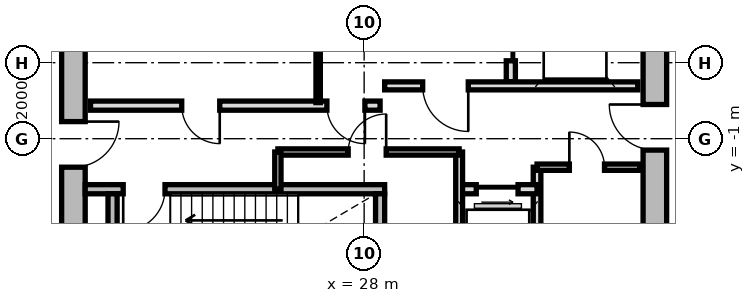
"""IFC4 building model, lengths in metres.
Left out: names, types, materials, properties, quantities, classifications, styles, units other than length and angle.
Written with IfcOpenShell. Run it as: python <this file> out.ifc"""

import sys

from ifc_helpers import new_model, si_unit, direction, frame, frame_2d, origin, place, context, subcontext, project, spatial, rectangle, extrude, source, transform, mapped, element, fill, save


model = new_model("IFC4")
c1 = context("Model", 3, precision=1e-05, world=origin(), true_north=direction((0.0, 1.0)))
c2 = subcontext(c1, "Body", "Model", "MODEL_VIEW")
j1 = project(units=[si_unit("LENGTHUNIT", "METRE"), si_unit("PLANEANGLEUNIT", "RADIAN")], contexts=[c1])
p1 = place(None, origin())
s1 = spatial("IfcSite", under=j1, at=p1, CompositionType="ELEMENT")
p2 = place(p1, origin())
s2 = spatial("IfcBuilding", under=s1, at=p2, CompositionType="ELEMENT")
p3 = place(p2, frame((0.0, 0.0, 186.15)))
s3 = spatial("IfcBuildingStorey", under=s2, at=p3, CompositionType="ELEMENT", Elevation=186.15)
m1 = source(origin(), c2, "Body", "SweptSolid", [
    extrude(rectangle(XDim=11.1, YDim=0.62, at=frame_2d((5.55, 0.0))), origin(), (0.0, 0.0, 1.0), 4.08),
])
p4 = place(p3, frame((20.35, -5.55, 0.0), z_axis=(0.0, 0.0, 1.0), x_axis=(0.0, 1.0, 0.0)))
e1 = element("IfcWall", 1, at=p4, inside=s3, PredefinedType="SHEAR", context=c2, shape_type="MappedRepresentation", body=[
    mapped(m1, transform((0.0, 0.0, 0.0), x_axis=(1.0, 0.0, 0.0), y_axis=(0.0, 1.0, 0.0), z_axis=(0.0, 0.0, 1.0), scale=1.0)),
])
p5 = place(p4, frame((3.8, 0.0, 0.0)))
e2 = element("IfcOpeningElement", 2, at=p5, cuts=e1, PredefinedType="OPENING", context=c2, shape_type="SweptSolid", body=[
    extrude(rectangle(XDim=1.2, YDim=2.15, at=frame_2d((0.6, 1.075))), frame((0.0, 0.32, 0.0), z_axis=(0.0, -1.0, 0.0), x_axis=(1.0, 0.0, 0.0)), (0.0, 0.0, 1.0), 0.64),
])
p6 = place(p3, frame((35.65, 5.55, 0.0), z_axis=(0.0, 0.0, 1.0), x_axis=(0.0, -1.0, 0.0)))
e3 = element("IfcWall", 3, at=p6, inside=s3, PredefinedType="SHEAR", context=c2, shape_type="MappedRepresentation", body=[
    mapped(m1, transform((0.0, 0.0, 0.0), x_axis=(1.0, 0.0, 0.0), y_axis=(0.0, 1.0, 0.0), z_axis=(0.0, 0.0, 1.0), scale=1.0)),
])
p7 = place(p6, frame((5.65, 0.0, 0.0)))
e4 = element("IfcOpeningElement", 4, at=p7, cuts=e3, PredefinedType="OPENING", context=c2, shape_type="SweptSolid", body=[
    extrude(rectangle(XDim=1.2, YDim=2.15, at=frame_2d((0.6, 1.075))), frame((0.0, 0.32, 0.0), z_axis=(0.0, -1.0, 0.0), x_axis=(1.0, 0.0, 0.0)), (0.0, 0.0, 1.0), 0.64),
])
p8 = place(p6, frame((9.3, 0.0, 0.0)))
e5 = element("IfcOpeningElement", 5, at=p8, cuts=e3, PredefinedType="OPENING", context=c2, shape_type="SweptSolid", body=[
    extrude(rectangle(XDim=1.0, YDim=2.1, at=frame_2d((0.5, 1.05))), frame((0.0, 0.32, 0.0), z_axis=(0.0, -1.0, 0.0), x_axis=(1.0, 0.0, 0.0)), (0.0, 0.0, 1.0), 0.64),
])
m2 = source(origin(), c2, "Body", "SweptSolid", [
    extrude(rectangle(XDim=7.88, YDim=0.24, at=frame_2d((3.94, 0.0))), origin(), (0.0, 0.0, 1.0), 4.08),
])
p9 = place(p3, frame((20.66, -2.33, 0.0), z_axis=(0.0, 0.0, 1.0), x_axis=(1.0, 0.0, 0.0)))
e6 = element("IfcWall", 6, at=p9, inside=s3, PredefinedType="PARTITIONING", context=c2, shape_type="MappedRepresentation", body=[
    mapped(m2, transform((0.0, 0.0, 0.0), x_axis=(1.0, 0.0, 0.0), y_axis=(0.0, 1.0, 0.0), z_axis=(0.0, 0.0, 1.0), scale=1.0)),
])
p10 = place(p9, frame((1.0, 0.0, 0.0)))
e7 = element("IfcOpeningElement", 7, at=p10, cuts=e6, PredefinedType="OPENING", context=c2, shape_type="SweptSolid", body=[
    extrude(rectangle(XDim=1.1, YDim=2.15, at=frame_2d((0.55, 1.075))), frame((0.0, 0.13, 0.0), z_axis=(0.0, -1.0, 0.0), x_axis=(1.0, 0.0, 0.0)), (0.0, 0.0, 1.0), 0.26),
])
m3 = source(origin(), c2, "Body", "SweptSolid", [
    extrude(rectangle(XDim=3.19, YDim=0.24, at=frame_2d((1.595, 0.0))), origin(), (0.0, 0.0, 1.0), 4.08),
])
for number, where, z_axis, x_axis in (
    (8, (21.38, -5.64, 0.0), (0.0, 0.0, 1.0), (0.0, 1.0, 0.0)),
    (9, (28.42, -5.64, 0.0), (0.0, 0.0, 1.0), (0.0, 1.0, 0.0)),
):
    element("IfcWall", number, at=place(p3, frame(where, z_axis=z_axis, x_axis=x_axis)), inside=s3, PredefinedType="PARTITIONING", context=c2, shape_type="MappedRepresentation", body=[
        mapped(m3, transform((0.0, 0.0, 0.0), x_axis=(1.0, 0.0, 0.0), y_axis=(0.0, 1.0, 0.0), z_axis=(0.0, 0.0, 1.0), scale=1.0)),
    ])
m4 = source(origin(), c2, "Body", "SweptSolid", [
    extrude(rectangle(XDim=5.0, YDim=0.24, at=frame_2d((2.5, 0.0))), origin(), (0.0, 0.0, 1.0), 4.065),
])
p11 = place(p3, frame((31.86, 0.5, 0.0), z_axis=(0.0, 0.0, 1.0), x_axis=(0.0, 1.0, 0.0)))
e10 = element("IfcWall", 10, at=p11, inside=s3, PredefinedType="PARTITIONING", context=c2, shape_type="MappedRepresentation", body=[
    mapped(m4, transform((0.0, 0.0, 0.0), x_axis=(1.0, 0.0, 0.0), y_axis=(0.0, 1.0, 0.0), z_axis=(0.0, 0.0, 1.0), scale=1.0)),
])
p12 = place(p11, frame((3.05, 0.0, 0.0)))
e11 = element("IfcOpeningElement", 11, at=p12, cuts=e10, PredefinedType="OPENING", context=c2, shape_type="SweptSolid", body=[
    extrude(rectangle(XDim=1.3, YDim=2.2, at=frame_2d((0.65, 1.1))), frame((0.0, 0.13, 0.0), z_axis=(0.0, -1.0, 0.0), x_axis=(1.0, 0.0, 0.0)), (0.0, 0.0, 1.0), 0.26),
])
p13 = place(p11, frame((0.55, 0.0, 0.0)))
e12 = element("IfcOpeningElement", 12, at=p13, cuts=e10, PredefinedType="OPENING", context=c2, shape_type="SweptSolid", body=[
    extrude(rectangle(XDim=1.3, YDim=2.2, at=frame_2d((0.65, 1.1))), frame((0.0, 0.13, 0.0), z_axis=(0.0, -1.0, 0.0), x_axis=(1.0, 0.0, 0.0)), (0.0, 0.0, 1.0), 0.26),
])
m5 = source(origin(), c2, "Body", "SweptSolid", [
    extrude(rectangle(XDim=6.66, YDim=0.21, at=frame_2d((3.33, 0.0))), origin(), (0.0, 0.0, 1.0), 4.065),
])
p14 = place(p3, frame((28.54, 0.39, 0.0), z_axis=(0.0, 0.0, 1.0), x_axis=(1.0, 0.0, 0.0)))
e13 = element("IfcWall", 13, at=p14, inside=s3, PredefinedType="PARTITIONING", context=c2, shape_type="MappedRepresentation", body=[
    mapped(m5, transform((0.0, 0.0, 0.0), x_axis=(1.0, 0.0, 0.0), y_axis=(0.0, 1.0, 0.0), z_axis=(0.0, 0.0, 1.0), scale=1.0)),
])
p15 = place(p14, frame((1.0, 0.0, 0.0)))
e14 = element("IfcOpeningElement", 14, at=p15, cuts=e13, PredefinedType="OPENING", context=c2, shape_type="SweptSolid", body=[
    extrude(rectangle(XDim=1.2, YDim=2.15, at=frame_2d((0.6, 1.075))), frame((0.0, 0.115, 0.0), z_axis=(0.0, -1.0, 0.0), x_axis=(1.0, 0.0, 0.0)), (0.0, 0.0, 1.0), 0.23),
])
m6 = source(origin(), c2, "Body", "SweptSolid", [
    extrude(rectangle(XDim=7.62, YDim=0.24, at=frame_2d((3.81, 0.0))), origin(), (0.0, 0.0, 1.0), 4.065),
])
p16 = place(p3, frame((20.8, -0.13, 0.0), z_axis=(0.0, 0.0, 1.0), x_axis=(1.0, 0.0, 0.0)))
e15 = element("IfcWall", 15, at=p16, inside=s3, PredefinedType="PARTITIONING", context=c2, shape_type="MappedRepresentation", body=[
    mapped(m6, transform((0.0, 0.0, 0.0), x_axis=(1.0, 0.0, 0.0), y_axis=(0.0, 1.0, 0.0), z_axis=(0.0, 0.0, 1.0), scale=1.0)),
])
p17 = place(p16, frame((6.22, 0.0, 0.0)))
e16 = element("IfcOpeningElement", 16, at=p17, cuts=e15, PredefinedType="OPENING", context=c2, shape_type="SweptSolid", body=[
    extrude(rectangle(XDim=1.0, YDim=2.1, at=frame_2d((0.5, 1.05))), frame((0.0, 0.13, 0.0), z_axis=(0.0, -1.0, 0.0), x_axis=(1.0, 0.0, 0.0)), (0.0, 0.0, 1.0), 0.26),
])
p18 = place(p16, frame((2.4, 0.0, 0.0)))
e17 = element("IfcOpeningElement", 17, at=p18, cuts=e15, PredefinedType="OPENING", context=c2, shape_type="SweptSolid", body=[
    extrude(rectangle(XDim=1.0, YDim=2.1, at=frame_2d((0.5, 1.05))), frame((0.0, 0.13, 0.0), z_axis=(0.0, -1.0, 0.0), x_axis=(1.0, 0.0, 0.0)), (0.0, 0.0, 1.0), 0.26),
])
m7 = source(origin(), c2, "Body", "SweptSolid", [
    extrude(rectangle(XDim=2.33, YDim=0.115, at=frame_2d((1.165, 0.0))), origin(), (0.0, 0.0, 1.0), 4.065),
])
p19 = place(p3, frame((26.79, -0.05, 0.0), z_axis=(0.0, 0.0, 1.0), x_axis=(0.0, 1.0, 0.0)))
e18 = element("IfcWall", 18, at=p19, inside=s3, PredefinedType="PARTITIONING", context=c2, shape_type="MappedRepresentation", body=[
    mapped(m7, transform((0.0, 0.0, 0.0), x_axis=(1.0, 0.0, 0.0), y_axis=(0.0, 1.0, 0.0), z_axis=(0.0, 0.0, 1.0), scale=1.0)),
])
m8 = source(origin(), c2, "Body", "SweptSolid", [
    extrude(rectangle(XDim=3.8, YDim=0.2, at=frame_2d((1.9, 0.0))), origin(), (0.0, 0.0, 1.0), 4.065),
])
p20 = place(p3, frame((32.55, -5.55, 0.0), z_axis=(0.0, 0.0, 1.0), x_axis=(0.0, 1.0, 0.0)))
e19 = element("IfcWall", 19, at=p20, inside=s3, PredefinedType="PARTITIONING", context=c2, shape_type="MappedRepresentation", body=[
    mapped(m8, transform((0.0, 0.0, 0.0), x_axis=(1.0, 0.0, 0.0), y_axis=(0.0, 1.0, 0.0), z_axis=(0.0, 0.0, 1.0), scale=1.0)),
])
m9 = source(origin(), c2, "Body", "SweptSolid", [
    extrude(rectangle(XDim=2.05, YDim=0.24, at=frame_2d((1.025, 0.0))), origin(), (0.0, 0.0, 1.0), 4.065),
])
p21 = place(p3, frame((30.5, -2.33, 0.0), z_axis=(0.0, 0.0, 1.0), x_axis=(1.0, 0.0, 0.0)))
e20 = element("IfcWall", 20, at=p21, inside=s3, PredefinedType="PARTITIONING", context=c2, shape_type="MappedRepresentation", body=[
    mapped(m9, transform((0.0, 0.0, 0.0), x_axis=(1.0, 0.0, 0.0), y_axis=(0.0, 1.0, 0.0), z_axis=(0.0, 0.0, 1.0), scale=1.0)),
])
p22 = place(p21, frame((0.45, 0.0, 0.0)))
e21 = element("IfcOpeningElement", 21, at=p22, cuts=e20, PredefinedType="OPENING", context=c2, shape_type="SweptSolid", body=[
    extrude(rectangle(XDim=1.1, YDim=2.2, at=frame_2d((0.55, 1.1))), frame((0.0, 0.13, 0.0), z_axis=(0.0, -1.0, 0.0), x_axis=(1.0, 0.0, 0.0)), (0.0, 0.0, 1.0), 0.26),
])
m10 = source(origin(), c2, "Body", "SweptSolid", [
    extrude(rectangle(XDim=4.2, YDim=0.18, at=frame_2d((2.1, 0.0))), origin(), (0.0, 0.0, 1.0), 4.065),
])
p23 = place(p3, frame((30.5, -5.55, 0.0), z_axis=(0.0, 0.0, 1.0), x_axis=(0.0, 1.0, 0.0)))
e22 = element("IfcWall", 22, at=p23, inside=s3, PredefinedType="PARTITIONING", context=c2, shape_type="MappedRepresentation", body=[
    mapped(m10, transform((0.0, 0.0, 0.0), x_axis=(1.0, 0.0, 0.0), y_axis=(0.0, 1.0, 0.0), z_axis=(0.0, 0.0, 1.0), scale=1.0)),
])
m11 = source(origin(), c2, "Body", "SweptSolid", [
    extrude(rectangle(XDim=4.77, YDim=0.165, at=frame_2d((2.385, 0.0))), origin(), (0.0, 0.0, 1.0), 4.065),
])
p24 = place(p3, frame((25.73, -1.35, 0.0), z_axis=(0.0, 0.0, 1.0), x_axis=(1.0, 0.0, 0.0)))
e23 = element("IfcWall", 23, at=p24, inside=s3, PredefinedType="PARTITIONING", context=c2, shape_type="MappedRepresentation", body=[
    mapped(m11, transform((0.0, 0.0, 0.0), x_axis=(1.0, 0.0, 0.0), y_axis=(0.0, 1.0, 0.0), z_axis=(0.0, 0.0, 1.0), scale=1.0)),
])
p25 = place(p24, frame((1.85, 0.0, 0.0)))
e24 = element("IfcOpeningElement", 24, at=p25, cuts=e23, PredefinedType="OPENING", context=c2, shape_type="SweptSolid", body=[
    extrude(rectangle(XDim=1.0, YDim=2.1, at=frame_2d((0.5, 1.05))), frame((0.0, 0.093, 0.0), z_axis=(0.0, -1.0, 0.0), x_axis=(1.0, 0.0, 0.0)), (0.0, 0.0, 1.0), 0.185),
])
m12 = source(origin(), c2, "Body", "SweptSolid", [
    extrude(rectangle(XDim=0.98, YDim=0.165, at=frame_2d((0.49, 0.0))), origin(), (0.0, 0.0, 1.0), 4.065),
])
p26 = place(p3, frame((25.73, -2.33, 0.0), z_axis=(0.0, 0.0, 1.0), x_axis=(0.0, 1.0, 0.0)))
e25 = element("IfcWall", 25, at=p26, inside=s3, PredefinedType="PARTITIONING", context=c2, shape_type="MappedRepresentation", body=[
    mapped(m12, transform((0.0, 0.0, 0.0), x_axis=(1.0, 0.0, 0.0), y_axis=(0.0, 1.0, 0.0), z_axis=(0.0, 0.0, 1.0), scale=1.0)),
])
m13 = source(origin(), c2, "Body", "SweptSolid", [
    extrude(rectangle(XDim=2.7, YDim=0.165, at=frame_2d((1.35, 0.0))), origin(), (0.0, 0.0, 1.0), 4.065),
])
p27 = place(p3, frame((32.55, -1.75, 0.0), z_axis=(0.0, 0.0, 1.0), x_axis=(1.0, 0.0, 0.0)))
e26 = element("IfcWall", 26, at=p27, inside=s3, PredefinedType="PARTITIONING", context=c2, shape_type="MappedRepresentation", body=[
    mapped(m13, transform((0.0, 0.0, 0.0), x_axis=(1.0, 0.0, 0.0), y_axis=(0.0, 1.0, 0.0), z_axis=(0.0, 0.0, 1.0), scale=1.0)),
])
p28 = place(p27, frame((0.85, 0.0, 0.0)))
e27 = element("IfcOpeningElement", 27, at=p28, cuts=e26, PredefinedType="OPENING", context=c2, shape_type="SweptSolid", body=[
    extrude(rectangle(XDim=0.925, YDim=2.1, at=frame_2d((0.462, 1.05))), frame((0.0, 0.093, 0.0), z_axis=(0.0, -1.0, 0.0), x_axis=(1.0, 0.0, 0.0)), (0.0, 0.0, 1.0), 0.185),
])
m14 = source(origin(), c2, "Body", "SweptSolid", [
    extrude(rectangle(XDim=1.1, YDim=2.15, at=frame_2d((0.55, 1.075))), frame((0.0, 0.025, 0.0), z_axis=(0.0, -1.0, 0.0), x_axis=(1.0, 0.0, 0.0)), (0.0, 0.0, 1.0), 0.05),
])
p29 = place(p10, frame((1.1, 0.0, 0.0), z_axis=(0.0, 0.0, 1.0), x_axis=(-1.0, 0.0, 0.0)))
e28 = element("IfcDoor", 28, at=p29, inside=s3, OperationType="SINGLE_SWING_RIGHT", PredefinedType="DOOR", context=c2, shape_type="MappedRepresentation", body=[
    mapped(m14, transform((0.0, 0.0, 0.0), x_axis=(1.0, 0.0, 0.0), y_axis=(0.0, 1.0, 0.0), z_axis=(0.0, 0.0, 1.0), scale=1.0)),
])
fill(e7, e28)
m15 = source(origin(), c2, "Body", "SweptSolid", [
    extrude(rectangle(XDim=1.3, YDim=2.2, at=frame_2d((0.65, 1.1))), frame((0.0, 0.025, 0.0), z_axis=(0.0, -1.0, 0.0), x_axis=(1.0, 0.0, 0.0)), (0.0, 0.0, 1.0), 0.05),
])
p30 = place(p13, origin())
e29 = element("IfcDoor", 29, at=p30, inside=s3, OperationType="SLIDING_TO_RIGHT", PredefinedType="DOOR", context=c2, shape_type="MappedRepresentation", body=[
    mapped(m15, transform((0.0, 0.0, 0.0), x_axis=(1.0, 0.0, 0.0), y_axis=(0.0, 1.0, 0.0), z_axis=(0.0, 0.0, 1.0), scale=1.0)),
])
fill(e12, e29)
m16 = source(origin(), c2, "Body", "SweptSolid", [
    extrude(rectangle(XDim=1.2, YDim=2.15, at=frame_2d((0.6, 1.075))), frame((0.0, 0.025, 0.0), z_axis=(0.0, -1.0, 0.0), x_axis=(1.0, 0.0, 0.0)), (0.0, 0.0, 1.0), 0.05),
])
p31 = place(p15, frame((1.2, 0.0, 0.0), z_axis=(0.0, 0.0, 1.0), x_axis=(-1.0, 0.0, 0.0)))
e30 = element("IfcDoor", 30, at=p31, inside=s3, OperationType="SINGLE_SWING_LEFT", PredefinedType="DOOR", context=c2, shape_type="MappedRepresentation", body=[
    mapped(m16, transform((0.0, 0.0, 0.0), x_axis=(1.0, 0.0, 0.0), y_axis=(0.0, 1.0, 0.0), z_axis=(0.0, 0.0, 1.0), scale=1.0)),
])
fill(e14, e30)
p32 = place(p5, frame((1.2, 0.0, 0.0), z_axis=(0.0, 0.0, 1.0), x_axis=(-1.0, 0.0, 0.0)))
e31 = element("IfcDoor", 31, at=p32, inside=s3, OperationType="SINGLE_SWING_LEFT", PredefinedType="DOOR", context=c2, shape_type="MappedRepresentation", body=[
    mapped(m16, transform((0.0, 0.0, 0.0), x_axis=(1.0, 0.0, 0.0), y_axis=(0.0, 1.0, 0.0), z_axis=(0.0, 0.0, 1.0), scale=1.0)),
])
fill(e2, e31)
p33 = place(p7, frame((1.2, 0.0, 0.0), z_axis=(0.0, 0.0, 1.0), x_axis=(-1.0, 0.0, 0.0)))
e32 = element("IfcDoor", 32, at=p33, inside=s3, OperationType="SINGLE_SWING_RIGHT", PredefinedType="DOOR", context=c2, shape_type="MappedRepresentation", body=[
    mapped(m16, transform((0.0, 0.0, 0.0), x_axis=(1.0, 0.0, 0.0), y_axis=(0.0, 1.0, 0.0), z_axis=(0.0, 0.0, 1.0), scale=1.0)),
])
fill(e4, e32)
m17 = source(origin(), c2, "Body", "SweptSolid", [
    extrude(rectangle(XDim=1.0, YDim=2.1, at=frame_2d((0.5, 1.05))), frame((0.0, 0.025, 0.0), z_axis=(0.0, -1.0, 0.0), x_axis=(1.0, 0.0, 0.0)), (0.0, 0.0, 1.0), 0.05),
])
p34 = place(p17, frame((1.0, 0.0, 0.0), z_axis=(0.0, 0.0, 1.0), x_axis=(-1.0, 0.0, 0.0)))
e33 = element("IfcDoor", 33, at=p34, inside=s3, OperationType="SINGLE_SWING_LEFT", PredefinedType="DOOR", context=c2, shape_type="MappedRepresentation", body=[
    mapped(m17, transform((0.0, 0.0, 0.0), x_axis=(1.0, 0.0, 0.0), y_axis=(0.0, 1.0, 0.0), z_axis=(0.0, 0.0, 1.0), scale=1.0)),
])
fill(e16, e33)
p35 = place(p18, frame((1.0, 0.0, 0.0), z_axis=(0.0, 0.0, 1.0), x_axis=(-1.0, 0.0, 0.0)))
e34 = element("IfcDoor", 34, at=p35, inside=s3, OperationType="SINGLE_SWING_LEFT", PredefinedType="DOOR", context=c2, shape_type="MappedRepresentation", body=[
    mapped(m17, transform((0.0, 0.0, 0.0), x_axis=(1.0, 0.0, 0.0), y_axis=(0.0, 1.0, 0.0), z_axis=(0.0, 0.0, 1.0), scale=1.0)),
])
fill(e17, e34)
m18 = source(origin(), c2, "Body", "SweptSolid", [
    extrude(rectangle(XDim=1.1, YDim=2.2, at=frame_2d((0.55, 1.1))), frame((0.0, 0.025, 0.0), z_axis=(0.0, -1.0, 0.0), x_axis=(1.0, 0.0, 0.0)), (0.0, 0.0, 1.0), 0.05),
])
p36 = place(p22, frame((1.1, 0.0, 0.0), z_axis=(0.0, 0.0, 1.0), x_axis=(-1.0, 0.0, 0.0)))
e35 = element("IfcDoor", 35, at=p36, inside=s3, OperationType="SLIDING_TO_RIGHT", PredefinedType="DOOR", context=c2, shape_type="MappedRepresentation", body=[
    mapped(m18, transform((0.0, 0.0, 0.0), x_axis=(1.0, 0.0, 0.0), y_axis=(0.0, 1.0, 0.0), z_axis=(0.0, 0.0, 1.0), scale=1.0)),
])
fill(e21, e35)
p37 = place(p25, origin())
e36 = element("IfcDoor", 36, at=p37, inside=s3, OperationType="SINGLE_SWING_RIGHT", PredefinedType="DOOR", context=c2, shape_type="MappedRepresentation", body=[
    mapped(m17, transform((0.0, 0.0, 0.0), x_axis=(1.0, 0.0, 0.0), y_axis=(0.0, 1.0, 0.0), z_axis=(0.0, 0.0, 1.0), scale=1.0)),
])
fill(e24, e36)
m19 = source(origin(), c2, "Body", "SweptSolid", [
    extrude(rectangle(XDim=0.925, YDim=2.1, at=frame_2d((0.462, 1.05))), frame((0.0, 0.025, 0.0), z_axis=(0.0, -1.0, 0.0), x_axis=(1.0, 0.0, 0.0)), (0.0, 0.0, 1.0), 0.05),
])
p38 = place(p28, origin())
e37 = element("IfcDoor", 37, at=p38, inside=s3, OperationType="SINGLE_SWING_LEFT", PredefinedType="DOOR", context=c2, shape_type="MappedRepresentation", body=[
    mapped(m19, transform((0.0, 0.0, 0.0), x_axis=(1.0, 0.0, 0.0), y_axis=(0.0, 1.0, 0.0), z_axis=(0.0, 0.0, 1.0), scale=1.0)),
])
fill(e27, e37)
save(model, sys.argv[1])
